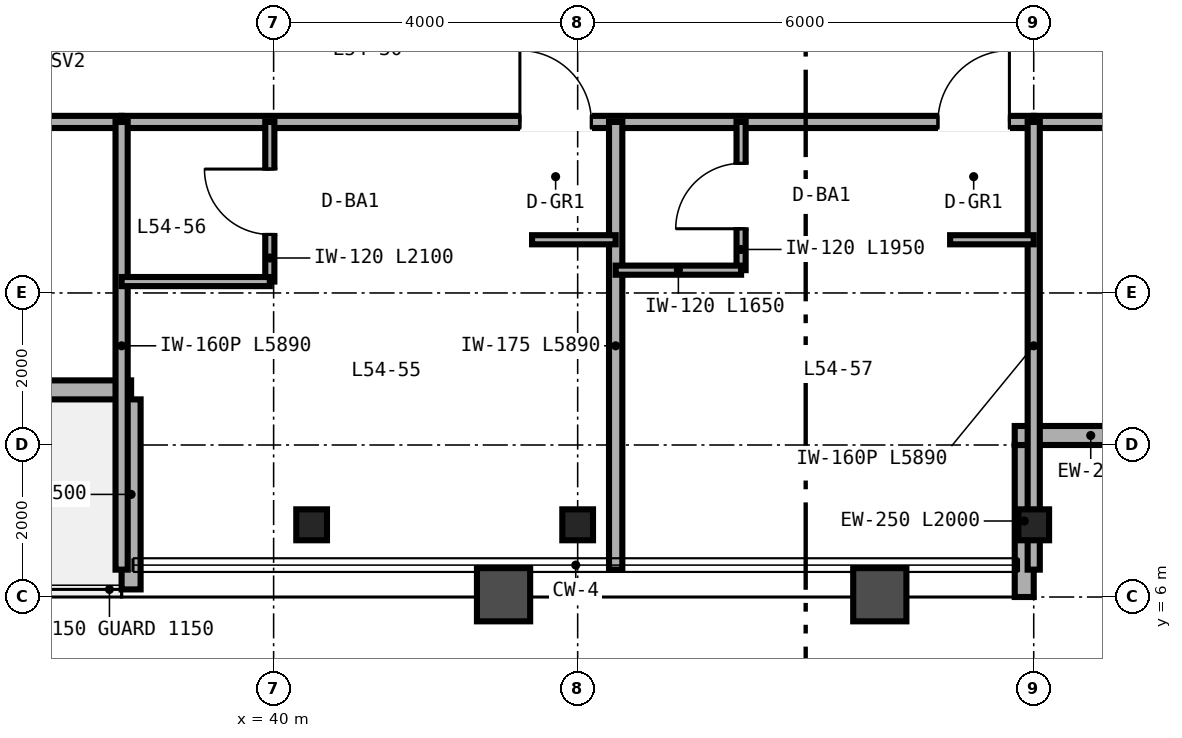
"""IFC4 building model, lengths in metres.
Left out: names, types, materials, properties, quantities, classifications, styles, units other than length and angle.
Written with IfcOpenShell. Run it as: python <this file> out.ifc"""

import sys

from ifc_helpers import new_model, si_unit, direction, frame, frame_2d, origin, origin_2d, place, context, subcontext, project, spatial, rectangle, i_section, extrude, source, transform, mapped, element, fill, save


model = new_model("IFC4")
c1 = context("Model", 3, precision=1e-05, world=origin(), true_north=direction((0.0, 1.0)))
c2 = subcontext(c1, "Body", "Model", "MODEL_VIEW")
j1 = project(units=[si_unit("LENGTHUNIT", "METRE"), si_unit("PLANEANGLEUNIT", "RADIAN")], contexts=[c1])
p1 = place(None, origin())
s1 = spatial("IfcSite", under=j1, at=p1, CompositionType="ELEMENT")
p2 = place(p1, origin())
s2 = spatial("IfcBuilding", under=s1, at=p2, CompositionType="ELEMENT")
p3 = place(p2, frame((0.0, 0.0, 213.6)))
s3 = spatial("IfcBuildingStorey", under=s2, at=p3, CompositionType="ELEMENT", Elevation=213.6)
m1 = source(origin(), c2, "Body", "SweptSolid", [
    extrude(i_section(OverallWidth=0.404, OverallDepth=0.407, WebThickness=0.027, FlangeThickness=0.044, FilletRadius=0.025, at=origin_2d()), origin(), (0.0, 0.0, 1.0), 3.37),
])
for number, where, z_axis, x_axis in (
    (1, (40.5, 6.95, 0.0), (0.0, 0.0, 1.0), (1.0, 0.0, 0.0)),
    (2, (44.0, 6.95, 0.0), (0.0, 0.0, 1.0), (1.0, 0.0, 0.0)),
    (3, (50.0, 6.95, 0.0), (0.0, 0.0, 1.0), (1.0, 0.0, 0.0)),
):
    element("IfcColumn", number, at=place(p3, frame(where, z_axis=z_axis, x_axis=x_axis)), inside=s3, PredefinedType="COLUMN", context=c2, shape_type="MappedRepresentation", body=[
        mapped(m1, transform((0.0, 0.0, 0.0), scale=1.0)),
    ])
p4 = place(p3, frame((49.875, 6.0, 0.0), z_axis=(0.0, 0.0, 1.0), x_axis=(0.0, 1.0, 0.0)))
e4 = element("IfcWall", 4, at=p4, inside=s3, PredefinedType="SOLIDWALL", context=c2, shape_type="SweptSolid", body=[
    extrude(rectangle(XDim=2.0, YDim=0.25, at=frame_2d((1.0, 0.0))), origin(), (0.0, 0.0, 1.0), 2.677),
])
p5 = place(p3, frame((49.75, 8.125, 0.0), z_axis=(0.0, 0.0, 1.0), x_axis=(1.0, 0.0, 0.0)))
e5 = element("IfcWall", 5, at=p5, inside=s3, PredefinedType="SOLIDWALL", context=c2, shape_type="SweptSolid", body=[
    extrude(rectangle(XDim=2.0, YDim=0.25, at=frame_2d((1.0, 0.0))), origin(), (0.0, 0.0, 1.0), 3.37),
])
p6 = place(p3, frame((25.875, 8.725, 0.0), z_axis=(0.0, 0.0, 1.0), x_axis=(1.0, 0.0, 0.0)))
e6 = element("IfcWall", 6, at=p6, inside=s3, PredefinedType="SOLIDWALL", context=c2, shape_type="SweptSolid", body=[
    extrude(rectangle(XDim=12.25, YDim=0.25, at=frame_2d((6.125, 0.0))), origin(), (0.0, 0.0, 1.0), 3.37),
])
p7 = place(p6, frame((5.6, 0.0, 0.0)))
e7 = element("IfcOpeningElement", 7, at=p7, cuts=e6, PredefinedType="OPENING", context=c2, shape_type="SweptSolid", body=[
    extrude(rectangle(XDim=1.05, YDim=2.15, at=frame_2d((0.525, 1.075))), frame((0.0, 0.135, 0.0), z_axis=(0.0, -1.0, 0.0), x_axis=(1.0, 0.0, 0.0)), (0.0, 0.0, 1.0), 0.27),
])
p8 = place(p3, frame((38.125, 6.1, 0.0), z_axis=(0.0, 0.0, 1.0), x_axis=(0.0, 1.0, 0.0)))
e8 = element("IfcWall", 8, at=p8, inside=s3, PredefinedType="SOLIDWALL", context=c2, shape_type="SweptSolid", body=[
    extrude(rectangle(XDim=2.5, YDim=0.25, at=frame_2d((1.25, 0.0))), origin(), (0.0, 0.0, 1.0), 2.443),
])
p9 = place(p3, frame((50.0, 12.25, 0.0), z_axis=(0.0, 0.0, 1.0), x_axis=(1.0, 0.0, 0.0)))
e9 = element("IfcWall", 9, at=p9, inside=s3, PredefinedType="PARTITIONING", context=c2, shape_type="SweptSolid", body=[
    extrude(rectangle(XDim=4.0, YDim=0.16, at=frame_2d((2.0, 0.0))), origin(), (0.0, 0.0, 1.0), 3.37),
])
p10 = place(p9, frame((1.52, 0.0, 0.0)))
e10 = element("IfcOpeningElement", 10, at=p10, cuts=e9, PredefinedType="OPENING", context=c2, shape_type="SweptSolid", body=[
    extrude(rectangle(XDim=0.96, YDim=2.15, at=frame_2d((0.48, 1.075))), frame((0.0, 0.09, 0.0), z_axis=(0.0, -1.0, 0.0), x_axis=(1.0, 0.0, 0.0)), (0.0, 0.0, 1.0), 0.18),
])
p11 = place(p3, frame((26.0, 12.25, 0.0), z_axis=(0.0, 0.0, 1.0), x_axis=(1.0, 0.0, 0.0)))
e11 = element("IfcWall", 11, at=p11, inside=s3, PredefinedType="PARTITIONING", context=c2, shape_type="SweptSolid", body=[
    extrude(rectangle(XDim=12.0, YDim=0.16, at=frame_2d((6.0, 0.0))), origin(), (0.0, 0.0, 1.0), 3.37),
])
p12 = place(p11, frame((5.2, 0.0, 0.0)))
e12 = element("IfcOpeningElement", 12, at=p12, cuts=e11, PredefinedType="OPENING", context=c2, shape_type="SweptSolid", body=[
    extrude(rectangle(XDim=0.96, YDim=2.15, at=frame_2d((0.48, 1.075))), frame((0.0, 0.09, 0.0), z_axis=(0.0, -1.0, 0.0), x_axis=(1.0, 0.0, 0.0)), (0.0, 0.0, 1.0), 0.18),
])
p13 = place(p3, frame((38.0, 12.25, 0.0), z_axis=(0.0, 0.0, 1.0), x_axis=(1.0, 0.0, 0.0)))
e13 = element("IfcWall", 13, at=p13, inside=s3, PredefinedType="PARTITIONING", context=c2, shape_type="SweptSolid", body=[
    extrude(rectangle(XDim=12.0, YDim=0.16, at=frame_2d((6.0, 0.0))), origin(), (0.0, 0.0, 1.0), 2.913),
])
p14 = place(p13, frame((5.24, 0.0, 0.0)))
e14 = element("IfcOpeningElement", 14, at=p14, cuts=e13, PredefinedType="OPENING", context=c2, shape_type="SweptSolid", body=[
    extrude(rectangle(XDim=0.94, YDim=2.15, at=frame_2d((0.47, 1.075))), frame((0.0, 0.09, 0.0), z_axis=(0.0, -1.0, 0.0), x_axis=(1.0, 0.0, 0.0)), (0.0, 0.0, 1.0), 0.18),
])
p15 = place(p13, frame((10.74, 0.0, 0.0)))
e15 = element("IfcOpeningElement", 15, at=p15, cuts=e13, PredefinedType="OPENING", context=c2, shape_type="SweptSolid", body=[
    extrude(rectangle(XDim=0.94, YDim=2.15, at=frame_2d((0.47, 1.075))), frame((0.0, 0.09, 0.0), z_axis=(0.0, -1.0, 0.0), x_axis=(1.0, 0.0, 0.0)), (0.0, 0.0, 1.0), 0.18),
])
p16 = place(p3, frame((38.0, 6.36, 0.0), z_axis=(0.0, 0.0, 1.0), x_axis=(0.0, 1.0, 0.0)))
e16 = element("IfcWall", 16, at=p16, inside=s3, PredefinedType="PARTITIONING", context=c2, shape_type="SweptSolid", body=[
    extrude(rectangle(XDim=5.89, YDim=0.16, at=frame_2d((2.945, 0.0))), origin(), (0.0, 0.0, 1.0), 2.443),
])
p17 = place(p3, frame((50.0, 6.36, 0.0), z_axis=(0.0, 0.0, 1.0), x_axis=(0.0, 1.0, 0.0)))
e17 = element("IfcWall", 17, at=p17, inside=s3, PredefinedType="PARTITIONING", context=c2, shape_type="SweptSolid", body=[
    extrude(rectangle(XDim=5.89, YDim=0.16, at=frame_2d((2.945, 0.0))), origin(), (0.0, 0.0, 1.0), 2.677),
])
p18 = place(p3, frame((44.5, 6.36, 0.0), z_axis=(0.0, 0.0, 1.0), x_axis=(0.0, 1.0, 0.0)))
e18 = element("IfcWall", 18, at=p18, inside=s3, PredefinedType="PARTITIONING", context=c2, shape_type="SweptSolid", body=[
    extrude(rectangle(XDim=5.89, YDim=0.175, at=frame_2d((2.945, 0.0))), origin(), (0.0, 0.0, 1.0), 2.677),
])
p19 = place(p3, frame((39.95, 10.15, 0.0), z_axis=(0.0, 0.0, 1.0), x_axis=(0.0, 1.0, 0.0)))
e19 = element("IfcWall", 19, at=p19, inside=s3, PredefinedType="PARTITIONING", context=c2, shape_type="SweptSolid", body=[
    extrude(rectangle(XDim=2.1, YDim=0.12, at=frame_2d((1.05, 0.0))), origin(), (0.0, 0.0, 1.0), 3.37),
])
p20 = place(p19, frame((0.62, 0.0, 0.0)))
e20 = element("IfcOpeningElement", 20, at=p20, cuts=e19, PredefinedType="OPENING", context=c2, shape_type="SweptSolid", body=[
    extrude(rectangle(XDim=0.86, YDim=2.1, at=frame_2d((0.43, 1.05))), frame((0.0, 0.07, 0.0), z_axis=(0.0, -1.0, 0.0), x_axis=(1.0, 0.0, 0.0)), (0.0, 0.0, 1.0), 0.14),
])
p21 = place(p3, frame((38.0, 10.15, 0.0), z_axis=(0.0, 0.0, 1.0), x_axis=(1.0, 0.0, 0.0)))
e21 = element("IfcWall", 21, at=p21, inside=s3, PredefinedType="PARTITIONING", context=c2, shape_type="SweptSolid", body=[
    extrude(rectangle(XDim=1.95, YDim=0.12, at=frame_2d((0.975, 0.0))), origin(), (0.0, 0.0, 1.0), 3.37),
])
p22 = place(p3, frame((43.4, 10.7, 0.0), z_axis=(0.0, 0.0, 1.0), x_axis=(1.0, 0.0, 0.0)))
e22 = element("IfcWall", 22, at=p22, inside=s3, PredefinedType="PARTITIONING", context=c2, shape_type="SweptSolid", body=[
    extrude(rectangle(XDim=1.1, YDim=0.12, at=frame_2d((0.55, 0.0))), origin(), (0.0, 0.0, 1.0), 3.37),
])
p23 = place(p3, frame((46.15, 10.3, 0.0), z_axis=(0.0, 0.0, 1.0), x_axis=(0.0, 1.0, 0.0)))
e23 = element("IfcWall", 23, at=p23, inside=s3, PredefinedType="PARTITIONING", context=c2, shape_type="SweptSolid", body=[
    extrude(rectangle(XDim=1.95, YDim=0.12, at=frame_2d((0.975, 0.0))), origin(), (0.0, 0.0, 1.0), 3.37),
])
p24 = place(p23, frame((0.545, 0.0, 0.0)))
e24 = element("IfcOpeningElement", 24, at=p24, cuts=e23, PredefinedType="OPENING", context=c2, shape_type="SweptSolid", body=[
    extrude(rectangle(XDim=0.86, YDim=2.1, at=frame_2d((0.43, 1.05))), frame((0.0, 0.07, 0.0), z_axis=(0.0, -1.0, 0.0), x_axis=(1.0, 0.0, 0.0)), (0.0, 0.0, 1.0), 0.14),
])
p25 = place(p3, frame((44.5, 10.3, 0.0), z_axis=(0.0, 0.0, 1.0), x_axis=(1.0, 0.0, 0.0)))
e25 = element("IfcWall", 25, at=p25, inside=s3, PredefinedType="PARTITIONING", context=c2, shape_type="SweptSolid", body=[
    extrude(rectangle(XDim=1.65, YDim=0.12, at=frame_2d((0.825, 0.0))), origin(), (0.0, 0.0, 1.0), 3.37),
])
p26 = place(p3, frame((48.9, 10.7, 0.0), z_axis=(0.0, 0.0, 1.0), x_axis=(1.0, 0.0, 0.0)))
e26 = element("IfcWall", 26, at=p26, inside=s3, PredefinedType="PARTITIONING", context=c2, shape_type="SweptSolid", body=[
    extrude(rectangle(XDim=1.1, YDim=0.12, at=frame_2d((0.55, 0.0))), origin(), (0.0, 0.0, 1.0), 3.37),
])
m2 = source(origin(), c2, "Body", "SweptSolid", [
    extrude(rectangle(XDim=0.86, YDim=2.1, at=frame_2d((0.43, 1.05))), frame((0.0, 0.025, 0.0), z_axis=(0.0, -1.0, 0.0), x_axis=(1.0, 0.0, 0.0)), (0.0, 0.0, 1.0), 0.05),
])
p27 = place(p20, origin())
e27 = element("IfcDoor", 27, at=p27, inside=s3, OperationType="SINGLE_SWING_RIGHT", PredefinedType="DOOR", context=c2, shape_type="MappedRepresentation", body=[
    mapped(m2, transform((0.0, 0.0, 0.0), scale=1.0)),
])
fill(e20, e27)
p28 = place(p24, origin())
e28 = element("IfcDoor", 28, at=p28, inside=s3, OperationType="SINGLE_SWING_LEFT", PredefinedType="DOOR", context=c2, shape_type="MappedRepresentation", body=[
    mapped(m2, transform((0.0, 0.0, 0.0), scale=1.0)),
])
fill(e24, e28)
m3 = source(origin(), c2, "Body", "SweptSolid", [
    extrude(rectangle(XDim=0.94, YDim=2.15, at=frame_2d((0.47, 1.075))), frame((0.0, 0.025, 0.0), z_axis=(0.0, -1.0, 0.0), x_axis=(1.0, 0.0, 0.0)), (0.0, 0.0, 1.0), 0.05),
])
p29 = place(p14, origin())
e29 = element("IfcDoor", 29, at=p29, inside=s3, OperationType="SINGLE_SWING_LEFT", PredefinedType="DOOR", context=c2, shape_type="MappedRepresentation", body=[
    mapped(m3, transform((0.0, 0.0, 0.0), scale=1.0)),
])
fill(e14, e29)
p30 = place(p15, origin())
e30 = element("IfcDoor", 30, at=p30, inside=s3, OperationType="SINGLE_SWING_RIGHT", PredefinedType="DOOR", context=c2, shape_type="MappedRepresentation", body=[
    mapped(m3, transform((0.0, 0.0, 0.0), scale=1.0)),
])
fill(e15, e30)
save(model, sys.argv[1])
